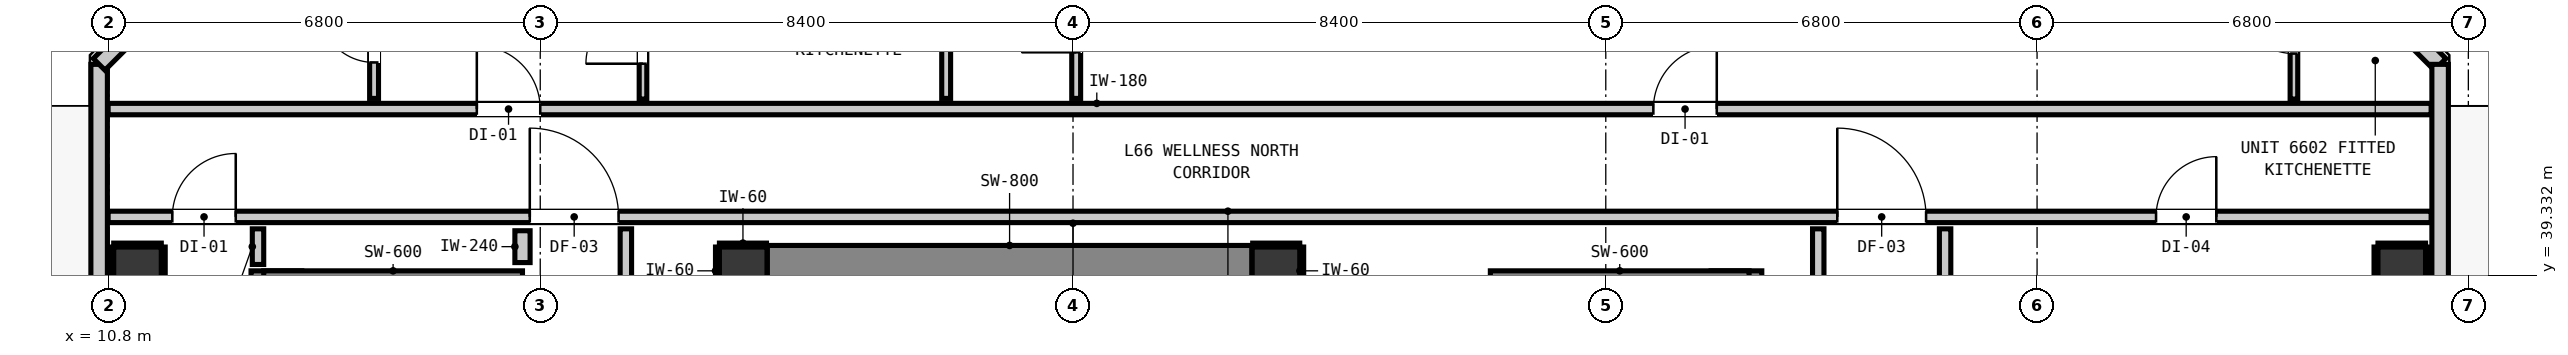
"""IFC4 building model, lengths in metres.
Left out: names, types, materials, properties, quantities, classifications, styles, units other than length and angle.
Written with IfcOpenShell. Run it as: python <this file> out.ifc"""

import sys

from ifc_helpers import new_model, si_unit, direction, frame, frame_2d, origin, origin_2d, place, context, subcontext, project, spatial, rectangle, extrude, element, fill, save


model = new_model("IFC4")
c1 = context("Model", 3, precision=1e-05, world=origin(), true_north=direction((0.0, 1.0)))
c2 = subcontext(c1, "Body", "Model", "MODEL_VIEW")
j1 = project(units=[si_unit("LENGTHUNIT", "METRE"), si_unit("PLANEANGLEUNIT", "RADIAN")], contexts=[c1])
p1 = place(None, origin())
s1 = spatial("IfcSite", under=j1, at=p1, CompositionType="ELEMENT")
p2 = place(p1, origin())
s2 = spatial("IfcBuilding", under=s1, at=p2, CompositionType="ELEMENT")
p3 = place(p2, frame((0.0, 0.0, 226.68)))
s3 = spatial("IfcBuildingStorey", under=s2, at=p3, CompositionType="ELEMENT", Elevation=226.68)
for number, where, z_axis, x_axis in (
    (1, (20.8, 39.4, 0.0), (0.0, 0.0, 1.0), (1.0, 0.0, 0.0)),
    (2, (29.2, 39.4, 0.0), (0.0, 0.0, 1.0), (1.0, 0.0, 0.0)),
):
    element("IfcColumn", number, at=place(p3, frame(where, z_axis=z_axis, x_axis=x_axis)), inside=s3, PredefinedType="COLUMN", context=c2, shape_type="SweptSolid", body=[
        extrude(rectangle(XDim=0.75, YDim=0.75, at=origin_2d()), origin(), (0.0, 0.0, 1.0), 4.6),
    ])
p4 = place(p3, frame((13.44, 31.08, 0.0), z_axis=(0.0, 0.0, 1.0), x_axis=(0.0, 1.0, 0.0)))
e3 = element("IfcWall", 3, at=p4, inside=s3, PredefinedType="SHEAR", context=c2, shape_type="SweptSolid", body=[
    extrude(rectangle(XDim=8.32, YDim=0.8, at=frame_2d((4.16, 0.0))), origin(), (0.0, 0.0, 1.0), 4.6),
])
p5 = place(p3, frame((13.24, 39.1, 0.0), z_axis=(0.0, 0.0, 1.0), x_axis=(1.0, 0.0, 0.0)))
e4 = element("IfcWall", 4, at=p5, inside=s3, PredefinedType="SHEAR", context=c2, shape_type="SweptSolid", body=[
    extrude(rectangle(XDim=4.08, YDim=0.6, at=frame_2d((2.04, 0.0))), origin(), (0.0, 0.0, 1.0), 4.6),
])
p6 = place(p3, frame((36.46, 31.08, 0.0), z_axis=(0.0, 0.0, 1.0), x_axis=(0.0, 1.0, 0.0)))
e5 = element("IfcWall", 5, at=p6, inside=s3, PredefinedType="SHEAR", context=c2, shape_type="SweptSolid", body=[
    extrude(rectangle(XDim=8.32, YDim=0.8, at=frame_2d((4.16, 0.0))), origin(), (0.0, 0.0, 1.0), 4.6),
])
p7 = place(p3, frame((32.58, 39.1, 0.0), z_axis=(0.0, 0.0, 1.0), x_axis=(1.0, 0.0, 0.0)))
e6 = element("IfcWall", 6, at=p7, inside=s3, PredefinedType="SHEAR", context=c2, shape_type="SweptSolid", body=[
    extrude(rectangle(XDim=4.08, YDim=0.6, at=frame_2d((2.04, 0.0))), origin(), (0.0, 0.0, 1.0), 4.6),
])
p8 = place(p3, frame((21.18, 39.4, 0.0), z_axis=(0.0, 0.0, 1.0), x_axis=(1.0, 0.0, 0.0)))
e7 = element("IfcWall", 7, at=p8, inside=s3, PredefinedType="SHEAR", context=c2, shape_type="SweptSolid", body=[
    extrude(rectangle(XDim=7.64, YDim=0.8, at=frame_2d((3.82, 0.0))), origin(), (0.0, 0.0, 1.0), 4.6),
])
for number, where, z_axis, x_axis in (
    (8, (11.25, 39.4, 0.0), (0.0, 0.0, 1.0), (1.0, 0.0, 0.0)),
    (9, (46.95, 39.4, 0.0), (0.0, 0.0, 1.0), (1.0, 0.0, 0.0)),
):
    element("IfcColumn", number, at=place(p3, frame(where, z_axis=z_axis, x_axis=x_axis)), inside=s3, PredefinedType="COLUMN", context=c2, shape_type="SweptSolid", body=[
        extrude(rectangle(XDim=0.75, YDim=0.75, at=origin_2d()), origin(), (0.0, 0.0, 1.0), 4.18),
    ])
p9 = place(p3, frame((10.645, 12.345, 0.0), z_axis=(0.0, 0.0, 1.0), x_axis=(0.0, 1.0, 0.0)))
e10 = element("IfcWall", 10, at=p9, inside=s3, PredefinedType="STANDARD", context=c2, shape_type="SweptSolid", body=[
    extrude(rectangle(XDim=30.31, YDim=0.26, at=frame_2d((15.155, 0.0))), origin(), (0.0, 0.0, 1.0), 4.18),
])
p10 = place(p9, frame((0.91, 0.0, 0.0)))
e11 = element("IfcOpeningElement", 11, at=p10, cuts=e10, PredefinedType="OPENING", context=c2, shape_type="SweptSolid", body=[
    extrude(rectangle(XDim=1.0, YDim=2.15, at=frame_2d((0.5, 1.075))), frame((0.0, 0.14, 0.0), z_axis=(0.0, -1.0, 0.0), x_axis=(1.0, 0.0, 0.0)), (0.0, 0.0, 1.0), 0.28),
])
p11 = place(p9, frame((3.732, 0.0, 0.85)))
e12 = element("IfcOpeningElement", 12, at=p11, cuts=e10, PredefinedType="OPENING", context=c2, shape_type="SweptSolid", body=[
    extrude(rectangle(XDim=1.65, YDim=1.75, at=frame_2d((0.825, 0.875))), frame((0.0, 0.14, 0.0), z_axis=(0.0, -1.0, 0.0), x_axis=(1.0, 0.0, 0.0)), (0.0, 0.0, 1.0), 0.28),
])
for number, where, z_axis, x_axis in (
    (13, (10.645, 42.655, 0.0), (0.0, 0.0, 1.0), (0.707, 0.707, 0.0)),
    (14, (45.455, 44.755, 0.0), (0.0, 0.0, 1.0), (0.707, -0.707, 0.0)),
):
    element("IfcWall", number, at=place(p3, frame(where, z_axis=z_axis, x_axis=x_axis)), inside=s3, PredefinedType="STANDARD", context=c2, shape_type="SweptSolid", body=[
        extrude(rectangle(XDim=2.97, YDim=0.26, at=frame_2d((1.485, 0.0))), origin(), (0.0, 0.0, 1.0), 4.18),
    ])
p12 = place(p3, frame((47.555, 42.655, 0.0), z_axis=(0.0, 0.0, 1.0), x_axis=(0.0, -1.0, 0.0)))
e15 = element("IfcWall", 15, at=p12, inside=s3, PredefinedType="STANDARD", context=c2, shape_type="SweptSolid", body=[
    extrude(rectangle(XDim=30.31, YDim=0.26, at=frame_2d((15.155, 0.0))), origin(), (0.0, 0.0, 1.0), 4.18),
])
p13 = place(p12, frame((23.818, 0.0, 0.0)))
e16 = element("IfcOpeningElement", 16, at=p13, cuts=e15, PredefinedType="OPENING", context=c2, shape_type="SweptSolid", body=[
    extrude(rectangle(XDim=1.0, YDim=2.15, at=frame_2d((0.5, 1.075))), frame((0.0, 0.14, 0.0), z_axis=(0.0, -1.0, 0.0), x_axis=(1.0, 0.0, 0.0)), (0.0, 0.0, 1.0), 0.28),
])
p14 = place(p3, frame((10.787, 40.25, 0.0), z_axis=(0.0, 0.0, 1.0), x_axis=(1.0, 0.0, 0.0)))
e17 = element("IfcWall", 17, at=p14, inside=s3, PredefinedType="PARTITIONING", context=c2, shape_type="SweptSolid", body=[
    extrude(rectangle(XDim=36.626, YDim=0.18, at=frame_2d((18.313, 0.0))), origin(), (0.0, 0.0, 1.0), 4.18),
])
p15 = place(p14, frame((6.648, 0.0, 0.0)))
e18 = element("IfcOpeningElement", 18, at=p15, cuts=e17, PredefinedType="OPENING", context=c2, shape_type="SweptSolid", body=[
    extrude(rectangle(XDim=1.4, YDim=2.15, at=frame_2d((0.7, 1.075))), frame((0.0, 0.1, 0.0), z_axis=(0.0, -1.0, 0.0), x_axis=(1.0, 0.0, 0.0)), (0.0, 0.0, 1.0), 0.2),
])
p16 = place(p14, frame((1.012, 0.0, 0.0)))
e19 = element("IfcOpeningElement", 19, at=p16, cuts=e17, PredefinedType="OPENING", context=c2, shape_type="SweptSolid", body=[
    extrude(rectangle(XDim=1.0, YDim=2.15, at=frame_2d((0.5, 1.075))), frame((0.0, 0.1, 0.0), z_axis=(0.0, -1.0, 0.0), x_axis=(1.0, 0.0, 0.0)), (0.0, 0.0, 1.0), 0.2),
])
p17 = place(p14, frame((27.263, 0.0, 0.0)))
e20 = element("IfcOpeningElement", 20, at=p17, cuts=e17, PredefinedType="OPENING", context=c2, shape_type="SweptSolid", body=[
    extrude(rectangle(XDim=1.4, YDim=2.15, at=frame_2d((0.7, 1.075))), frame((0.0, 0.1, 0.0), z_axis=(0.0, -1.0, 0.0), x_axis=(1.0, 0.0, 0.0)), (0.0, 0.0, 1.0), 0.2),
])
p18 = place(p14, frame((32.289, 0.0, 0.0)))
e21 = element("IfcOpeningElement", 21, at=p18, cuts=e17, PredefinedType="OPENING", context=c2, shape_type="SweptSolid", body=[
    extrude(rectangle(XDim=0.95, YDim=2.1, at=frame_2d((0.475, 1.05))), frame((0.0, 0.1, 0.0), z_axis=(0.0, -1.0, 0.0), x_axis=(1.0, 0.0, 0.0)), (0.0, 0.0, 1.0), 0.2),
])
p19 = place(p3, frame((10.787, 41.95, 0.0), z_axis=(0.0, 0.0, 1.0), x_axis=(1.0, 0.0, 0.0)))
e22 = element("IfcWall", 22, at=p19, inside=s3, PredefinedType="PARTITIONING", context=c2, shape_type="SweptSolid", body=[
    extrude(rectangle(XDim=36.626, YDim=0.18, at=frame_2d((18.313, 0.0))), origin(), (0.0, 0.0, 1.0), 4.18),
])
p20 = place(p19, frame((5.813, 0.0, 0.0)))
e23 = element("IfcOpeningElement", 23, at=p20, cuts=e22, PredefinedType="OPENING", context=c2, shape_type="SweptSolid", body=[
    extrude(rectangle(XDim=1.0, YDim=2.15, at=frame_2d((0.5, 1.075))), frame((0.0, 0.1, 0.0), z_axis=(0.0, -1.0, 0.0), x_axis=(1.0, 0.0, 0.0)), (0.0, 0.0, 1.0), 0.2),
])
p21 = place(p19, frame((24.363, 0.0, 0.0)))
e24 = element("IfcOpeningElement", 24, at=p21, cuts=e22, PredefinedType="OPENING", context=c2, shape_type="SweptSolid", body=[
    extrude(rectangle(XDim=1.0, YDim=2.15, at=frame_2d((0.5, 1.075))), frame((0.0, 0.1, 0.0), z_axis=(0.0, -1.0, 0.0), x_axis=(1.0, 0.0, 0.0)), (0.0, 0.0, 1.0), 0.2),
])
p22 = place(p3, frame((17.32, 39.53, 0.0), z_axis=(0.0, 0.0, 1.0), x_axis=(0.0, 1.0, 0.0)))
e25 = element("IfcWall", 25, at=p22, inside=s3, PredefinedType="PARTITIONING", context=c2, shape_type="SweptSolid", body=[
    extrude(rectangle(XDim=0.502, YDim=0.24, at=frame_2d((0.251, 0.0))), origin(), (0.0, 0.0, 1.0), 4.18),
])
p23 = place(p3, frame((13.15, 39.5, 0.0), z_axis=(0.0, 0.0, 1.0), x_axis=(0.0, 1.0, 0.0)))
e26 = element("IfcWall", 26, at=p23, inside=s3, PredefinedType="PARTITIONING", context=c2, shape_type="SweptSolid", body=[
    extrude(rectangle(XDim=0.562, YDim=0.18, at=frame_2d((0.281, 0.0))), origin(), (0.0, 0.0, 1.0), 2.185),
])
p24 = place(p3, frame((18.95, 39.058, 0.0), z_axis=(0.0, 0.0, 1.0), x_axis=(0.0, 1.0, 0.0)))
e27 = element("IfcWall", 27, at=p24, inside=s3, PredefinedType="PARTITIONING", context=c2, shape_type="SweptSolid", body=[
    extrude(rectangle(XDim=1.004, YDim=0.18, at=frame_2d((0.502, 0.0))), origin(), (0.0, 0.0, 1.0), 4.18),
])
p25 = place(p3, frame((37.75, 21.368, 0.0), z_axis=(0.0, 0.0, 1.0), x_axis=(0.0, 1.0, 0.0)))
e28 = element("IfcWall", 28, at=p25, inside=s3, PredefinedType="PARTITIONING", context=c2, shape_type="SweptSolid", body=[
    extrude(rectangle(XDim=18.694, YDim=0.18, at=frame_2d((9.347, 0.0))), origin(), (0.0, 0.0, 1.0), 4.18),
])
p26 = place(p3, frame((39.75, 37.468, 0.0), z_axis=(0.0, 0.0, 1.0), x_axis=(0.0, 1.0, 0.0)))
e29 = element("IfcWall", 29, at=p26, inside=s3, PredefinedType="PARTITIONING", context=c2, shape_type="SweptSolid", body=[
    extrude(rectangle(XDim=2.594, YDim=0.18, at=frame_2d((1.297, 0.0))), origin(), (0.0, 0.0, 1.0), 4.18),
])
p27 = place(p3, frame((14.98, 42.118, 0.0), z_axis=(0.0, 0.0, 1.0), x_axis=(0.0, 1.0, 0.0)))
e30 = element("IfcWall", 30, at=p27, inside=s3, PredefinedType="PARTITIONING", context=c2, shape_type="SweptSolid", body=[
    extrude(rectangle(XDim=2.495, YDim=0.14, at=frame_2d((1.248, 0.0))), origin(), (0.0, 0.0, 1.0), 4.18),
])
p28 = place(p27, frame((0.567, 0.0, 0.0)))
e31 = element("IfcOpeningElement", 31, at=p28, cuts=e30, PredefinedType="OPENING", context=c2, shape_type="SweptSolid", body=[
    extrude(rectangle(XDim=0.86, YDim=2.02, at=frame_2d((0.43, 1.01))), frame((0.0, 0.08, 0.0), z_axis=(0.0, -1.0, 0.0), x_axis=(1.0, 0.0, 0.0)), (0.0, 0.0, 1.0), 0.16),
])
p29 = place(p3, frame((24.0, 42.118, 0.0), z_axis=(0.0, 0.0, 1.0), x_axis=(0.0, 1.0, 0.0)))
e32 = element("IfcWall", 32, at=p29, inside=s3, PredefinedType="PARTITIONING", context=c2, shape_type="SweptSolid", body=[
    extrude(rectangle(XDim=2.495, YDim=0.14, at=frame_2d((1.248, 0.0))), origin(), (0.0, 0.0, 1.0), 4.18),
])
p30 = place(p3, frame((26.05, 42.118, 0.0), z_axis=(0.0, 0.0, 1.0), x_axis=(0.0, 1.0, 0.0)))
e33 = element("IfcWall", 33, at=p30, inside=s3, PredefinedType="PARTITIONING", context=c2, shape_type="SweptSolid", body=[
    extrude(rectangle(XDim=2.495, YDim=0.14, at=frame_2d((1.248, 0.0))), origin(), (0.0, 0.0, 1.0), 4.18),
])
p31 = place(p30, frame((0.727, 0.0, 0.0)))
e34 = element("IfcOpeningElement", 34, at=p31, cuts=e33, PredefinedType="OPENING", context=c2, shape_type="SweptSolid", body=[
    extrude(rectangle(XDim=0.86, YDim=2.02, at=frame_2d((0.43, 1.01))), frame((0.0, 0.08, 0.0), z_axis=(0.0, -1.0, 0.0), x_axis=(1.0, 0.0, 0.0)), (0.0, 0.0, 1.0), 0.16),
])
p32 = place(p3, frame((19.22, 42.108, 0.0), z_axis=(0.0, 0.0, 1.0), x_axis=(0.0, 1.0, 0.0)))
e35 = element("IfcWall", 35, at=p32, inside=s3, PredefinedType="PARTITIONING", context=c2, shape_type="SweptSolid", body=[
    extrude(rectangle(XDim=2.505, YDim=0.12, at=frame_2d((1.252, 0.0))), origin(), (0.0, 0.0, 1.0), 4.18),
])
p33 = place(p32, frame((0.557, 0.0, 0.0)))
e36 = element("IfcOpeningElement", 36, at=p33, cuts=e35, PredefinedType="OPENING", context=c2, shape_type="SweptSolid", body=[
    extrude(rectangle(XDim=0.9, YDim=2.1, at=frame_2d((0.45, 1.05))), frame((0.0, 0.07, 0.0), z_axis=(0.0, -1.0, 0.0), x_axis=(1.0, 0.0, 0.0)), (0.0, 0.0, 1.0), 0.14),
])
p34 = place(p3, frame((45.25, 42.108, 0.0), z_axis=(0.0, 0.0, 1.0), x_axis=(0.0, 1.0, 0.0)))
e37 = element("IfcWall", 37, at=p34, inside=s3, PredefinedType="PARTITIONING", context=c2, shape_type="SweptSolid", body=[
    extrude(rectangle(XDim=2.505, YDim=0.12, at=frame_2d((1.252, 0.0))), origin(), (0.0, 0.0, 1.0), 4.18),
])
p35 = place(p34, frame((0.717, 0.0, 0.0)))
e38 = element("IfcOpeningElement", 38, at=p35, cuts=e37, PredefinedType="OPENING", context=c2, shape_type="SweptSolid", body=[
    extrude(rectangle(XDim=0.9, YDim=2.1, at=frame_2d((0.45, 1.05))), frame((0.0, 0.07, 0.0), z_axis=(0.0, -1.0, 0.0), x_axis=(1.0, 0.0, 0.0)), (0.0, 0.0, 1.0), 0.14),
])
p36 = place(p3, frame((20.425, 39.807, 0.0), z_axis=(0.0, 0.0, 1.0), x_axis=(1.0, 0.0, 0.0)))
e39 = element("IfcWall", 39, at=p36, inside=s3, PredefinedType="PARTITIONING", context=c2, shape_type="SweptSolid", body=[
    extrude(rectangle(XDim=0.742, YDim=0.06, at=frame_2d((0.371, 0.0))), origin(), (0.0, 0.0, 1.0), 1.45),
])
p37 = place(p3, frame((20.393, 39.025, 0.0), z_axis=(0.0, 0.0, 1.0), x_axis=(0.0, 1.0, 0.0)))
e40 = element("IfcWall", 40, at=p37, inside=s3, PredefinedType="PARTITIONING", context=c2, shape_type="SweptSolid", body=[
    extrude(rectangle(XDim=0.75, YDim=0.06, at=frame_2d((0.375, 0.0))), origin(), (0.0, 0.0, 1.0), 1.45),
])
p38 = place(p3, frame((28.833, 39.807, 0.0), z_axis=(0.0, 0.0, 1.0), x_axis=(1.0, 0.0, 0.0)))
e41 = element("IfcWall", 41, at=p38, inside=s3, PredefinedType="PARTITIONING", context=c2, shape_type="SweptSolid", body=[
    extrude(rectangle(XDim=0.742, YDim=0.06, at=frame_2d((0.371, 0.0))), origin(), (0.0, 0.0, 1.0), 1.45),
])
for number, where, z_axis, x_axis in (
    (42, (29.607, 39.025, 0.0), (0.0, 0.0, 1.0), (0.0, 1.0, 0.0)),
    (43, (10.875, 39.807, 0.0), (0.0, 0.0, 1.0), (1.0, 0.0, 0.0)),
    (44, (10.843, 39.025, 0.0), (0.0, 0.0, 1.0), (0.0, 1.0, 0.0)),
    (45, (11.657, 39.025, 0.0), (0.0, 0.0, 1.0), (0.0, 1.0, 0.0)),
    (46, (46.575, 39.807, 0.0), (0.0, 0.0, 1.0), (1.0, 0.0, 0.0)),
    (47, (46.543, 39.025, 0.0), (0.0, 0.0, 1.0), (0.0, 1.0, 0.0)),
    (48, (47.357, 39.025, 0.0), (0.0, 0.0, 1.0), (0.0, 1.0, 0.0)),
):
    element("IfcWall", number, at=place(p3, frame(where, z_axis=z_axis, x_axis=x_axis)), inside=s3, PredefinedType="PARTITIONING", context=c2, shape_type="SweptSolid", body=[
        extrude(rectangle(XDim=0.75, YDim=0.06, at=frame_2d((0.375, 0.0))), origin(), (0.0, 0.0, 1.0), 1.45),
    ])
p39 = place(p15, origin())
e49 = element("IfcDoor", 49, at=p39, inside=s3, OperationType="SINGLE_SWING_LEFT", PredefinedType="DOOR", context=c2, shape_type="SweptSolid", body=[
    extrude(rectangle(XDim=1.4, YDim=2.15, at=frame_2d((0.7, 1.075))), frame((0.0, 0.025, 0.0), z_axis=(0.0, -1.0, 0.0), x_axis=(1.0, 0.0, 0.0)), (0.0, 0.0, 1.0), 0.05),
])
fill(e18, e49)
p40 = place(p16, origin())
e50 = element("IfcDoor", 50, at=p40, inside=s3, OperationType="SINGLE_SWING_RIGHT", PredefinedType="DOOR", context=c2, shape_type="SweptSolid", body=[
    extrude(rectangle(XDim=1.0, YDim=2.15, at=frame_2d((0.5, 1.075))), frame((0.0, 0.025, 0.0), z_axis=(0.0, -1.0, 0.0), x_axis=(1.0, 0.0, 0.0)), (0.0, 0.0, 1.0), 0.05),
])
fill(e19, e50)
p41 = place(p17, origin())
e51 = element("IfcDoor", 51, at=p41, inside=s3, OperationType="SINGLE_SWING_LEFT", PredefinedType="DOOR", context=c2, shape_type="SweptSolid", body=[
    extrude(rectangle(XDim=1.4, YDim=2.15, at=frame_2d((0.7, 1.075))), frame((0.0, 0.025, 0.0), z_axis=(0.0, -1.0, 0.0), x_axis=(1.0, 0.0, 0.0)), (0.0, 0.0, 1.0), 0.05),
])
fill(e20, e51)
p42 = place(p18, origin())
e52 = element("IfcDoor", 52, at=p42, inside=s3, OperationType="SINGLE_SWING_RIGHT", PredefinedType="DOOR", context=c2, shape_type="SweptSolid", body=[
    extrude(rectangle(XDim=0.95, YDim=2.1, at=frame_2d((0.475, 1.05))), frame((0.0, 0.025, 0.0), z_axis=(0.0, -1.0, 0.0), x_axis=(1.0, 0.0, 0.0)), (0.0, 0.0, 1.0), 0.05),
])
fill(e21, e52)
p43 = place(p20, origin())
e53 = element("IfcDoor", 53, at=p43, inside=s3, OperationType="SINGLE_SWING_LEFT", PredefinedType="DOOR", context=c2, shape_type="SweptSolid", body=[
    extrude(rectangle(XDim=1.0, YDim=2.15, at=frame_2d((0.5, 1.075))), frame((0.0, 0.025, 0.0), z_axis=(0.0, -1.0, 0.0), x_axis=(1.0, 0.0, 0.0)), (0.0, 0.0, 1.0), 0.05),
])
fill(e23, e53)
p44 = place(p28, origin())
e54 = element("IfcDoor", 54, at=p44, inside=s3, OperationType="SINGLE_SWING_RIGHT", PredefinedType="DOOR", context=c2, shape_type="SweptSolid", body=[
    extrude(rectangle(XDim=0.86, YDim=2.02, at=frame_2d((0.43, 1.01))), frame((0.0, 0.025, 0.0), z_axis=(0.0, -1.0, 0.0), x_axis=(1.0, 0.0, 0.0)), (0.0, 0.0, 1.0), 0.05),
])
fill(e31, e54)
p45 = place(p33, origin())
e55 = element("IfcDoor", 55, at=p45, inside=s3, OperationType="SINGLE_SWING_LEFT", PredefinedType="DOOR", context=c2, shape_type="SweptSolid", body=[
    extrude(rectangle(XDim=0.9, YDim=2.1, at=frame_2d((0.45, 1.05))), frame((0.0, 0.025, 0.0), z_axis=(0.0, -1.0, 0.0), x_axis=(1.0, 0.0, 0.0)), (0.0, 0.0, 1.0), 0.05),
])
fill(e36, e55)
p46 = place(p21, origin())
e56 = element("IfcDoor", 56, at=p46, inside=s3, OperationType="SINGLE_SWING_RIGHT", PredefinedType="DOOR", context=c2, shape_type="SweptSolid", body=[
    extrude(rectangle(XDim=1.0, YDim=2.15, at=frame_2d((0.5, 1.075))), frame((0.0, 0.025, 0.0), z_axis=(0.0, -1.0, 0.0), x_axis=(1.0, 0.0, 0.0)), (0.0, 0.0, 1.0), 0.05),
])
fill(e24, e56)
p47 = place(p31, origin())
e57 = element("IfcDoor", 57, at=p47, inside=s3, OperationType="SINGLE_SWING_LEFT", PredefinedType="DOOR", context=c2, shape_type="SweptSolid", body=[
    extrude(rectangle(XDim=0.86, YDim=2.02, at=frame_2d((0.43, 1.01))), frame((0.0, 0.025, 0.0), z_axis=(0.0, -1.0, 0.0), x_axis=(1.0, 0.0, 0.0)), (0.0, 0.0, 1.0), 0.05),
])
fill(e34, e57)
p48 = place(p35, origin())
e58 = element("IfcDoor", 58, at=p48, inside=s3, OperationType="SINGLE_SWING_RIGHT", PredefinedType="DOOR", context=c2, shape_type="SweptSolid", body=[
    extrude(rectangle(XDim=0.9, YDim=2.1, at=frame_2d((0.45, 1.05))), frame((0.0, 0.025, 0.0), z_axis=(0.0, -1.0, 0.0), x_axis=(1.0, 0.0, 0.0)), (0.0, 0.0, 1.0), 0.05),
])
fill(e38, e58)
save(model, sys.argv[1])
